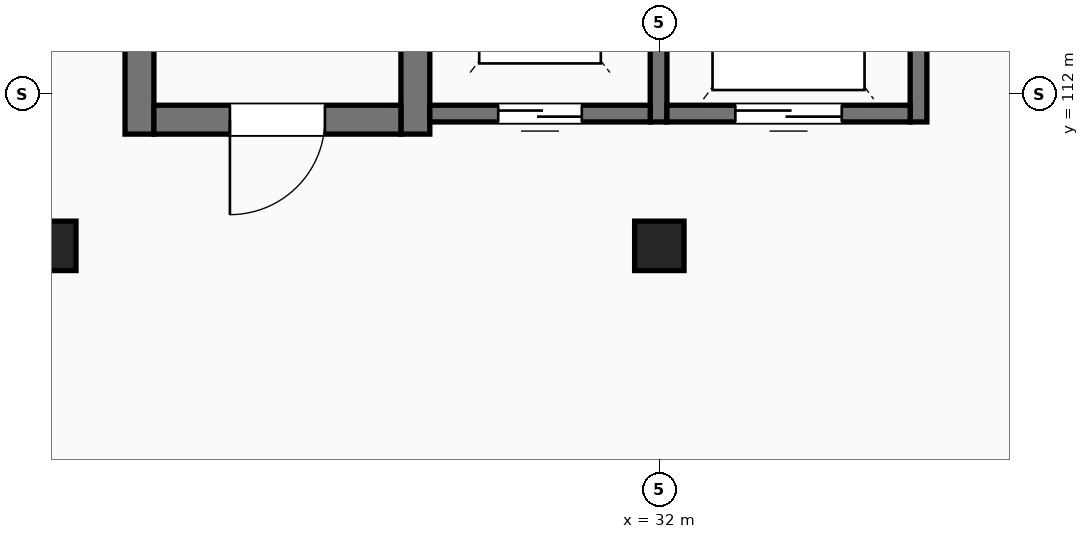
"""IFC4 building model, lengths in metres.
Left out: names, types, materials, properties, quantities, classifications, styles, units other than length and angle.
Written with IfcOpenShell. Run it as: python <this file> out.ifc"""

import sys

from ifc_helpers import new_model, si_unit, direction, frame, frame_2d, origin, origin_2d, place, context, subcontext, project, spatial, rectangle, extrude, element, fill, save


model = new_model("IFC4")
c1 = context("Model", 3, precision=1e-05, world=origin(), true_north=direction((0.0, 1.0)))
c2 = subcontext(c1, "Body", "Model", "MODEL_VIEW")
j1 = project(units=[si_unit("LENGTHUNIT", "METRE"), si_unit("PLANEANGLEUNIT", "RADIAN")], contexts=[c1])
p1 = place(None, origin())
s1 = spatial("IfcSite", under=j1, at=p1, CompositionType="ELEMENT")
p2 = place(p1, origin())
s2 = spatial("IfcBuilding", under=s1, at=p2, CompositionType="ELEMENT")
p3 = place(p2, origin())
s3 = spatial("IfcBuildingStorey", under=s2, at=p3, CompositionType="ELEMENT", Elevation=0.0)
for number, where, z_axis, x_axis in (
    (1, (24.0, 110.0, 0.0), (0.0, 0.0, 1.0), (1.0, 0.0, 0.0)),
    (2, (32.0, 110.0, 0.0), (0.0, 0.0, 1.0), (1.0, 0.0, 0.0)),
):
    element("IfcColumn", number, at=place(p3, frame(where, z_axis=z_axis, x_axis=x_axis)), inside=s3, PredefinedType="COLUMN", context=c2, shape_type="SweptSolid", body=[
        extrude(rectangle(XDim=0.65, YDim=0.65, at=origin_2d()), origin(), (0.0, 0.0, 1.0), 4.5),
    ])
for number, where, z_axis, x_axis in (
    (3, (25.16, 111.47, 0.0), (0.0, 0.0, 1.0), (0.0, 1.0, 0.0)),
    (4, (28.79, 121.53, 0.0), (0.0, 0.0, 1.0), (0.0, -1.0, 0.0)),
):
    element("IfcWall", number, at=place(p3, frame(where, z_axis=z_axis, x_axis=x_axis)), inside=s3, PredefinedType="SHEAR", context=c2, shape_type="SweptSolid", body=[
        extrude(rectangle(XDim=10.06, YDim=0.38, at=frame_2d((5.03, 0.0))), origin(), (0.0, 0.0, 1.0), 4.5),
    ])
p4 = place(p3, frame((28.6, 111.66, 0.0), z_axis=(0.0, 0.0, 1.0), x_axis=(-1.0, 0.0, 0.0)))
e5 = element("IfcWall", 5, at=p4, inside=s3, PredefinedType="SHEAR", context=c2, shape_type="SweptSolid", body=[
    extrude(rectangle(XDim=3.25, YDim=0.38, at=frame_2d((1.625, 0.0))), origin(), (0.0, 0.0, 1.0), 4.5),
])
p5 = place(p4, frame((1.0, 0.0, 0.0)))
e6 = element("IfcOpeningElement", 6, at=p5, cuts=e5, PredefinedType="OPENING", context=c2, shape_type="SweptSolid", body=[
    extrude(rectangle(XDim=1.25, YDim=2.2, at=frame_2d((0.625, 1.1))), frame((0.0, 0.2, 0.0), z_axis=(0.0, -1.0, 0.0), x_axis=(1.0, 0.0, 0.0)), (0.0, 0.0, 1.0), 0.4),
])
p6 = place(p3, frame((31.99, 115.27, 0.0), z_axis=(0.0, 0.0, 1.0), x_axis=(0.0, -1.0, 0.0)))
e7 = element("IfcWall", 7, at=p6, inside=s3, PredefinedType="SHEAR", context=c2, shape_type="SweptSolid", body=[
    extrude(rectangle(XDim=3.64, YDim=0.22, at=frame_2d((1.82, 0.0))), origin(), (0.0, 0.0, 1.0), 4.5),
])
p7 = place(p3, frame((31.88, 111.74, 0.0), z_axis=(0.0, 0.0, 1.0), x_axis=(-1.0, 0.0, 0.0)))
e8 = element("IfcWall", 8, at=p7, inside=s3, PredefinedType="SHEAR", context=c2, shape_type="SweptSolid", body=[
    extrude(rectangle(XDim=2.9, YDim=0.22, at=frame_2d((1.45, 0.0))), origin(), (0.0, 0.0, 1.0), 4.5),
])
p8 = place(p7, frame((0.9, 0.0, 0.0)))
e9 = element("IfcOpeningElement", 9, at=p8, cuts=e8, PredefinedType="OPENING", context=c2, shape_type="SweptSolid", body=[
    extrude(rectangle(XDim=1.1, YDim=2.2, at=frame_2d((0.55, 1.1))), frame((0.0, 0.12, 0.0), z_axis=(0.0, -1.0, 0.0), x_axis=(1.0, 0.0, 0.0)), (0.0, 0.0, 1.0), 0.24),
])
p9 = place(p3, frame((35.41, 115.27, 0.0), z_axis=(0.0, 0.0, 1.0), x_axis=(0.0, -1.0, 0.0)))
e10 = element("IfcWall", 10, at=p9, inside=s3, PredefinedType="SHEAR", context=c2, shape_type="SweptSolid", body=[
    extrude(rectangle(XDim=3.64, YDim=0.22, at=frame_2d((1.82, 0.0))), origin(), (0.0, 0.0, 1.0), 4.5),
])
p10 = place(p3, frame((35.3, 111.74, 0.0), z_axis=(0.0, 0.0, 1.0), x_axis=(-1.0, 0.0, 0.0)))
e11 = element("IfcWall", 11, at=p10, inside=s3, PredefinedType="SHEAR", context=c2, shape_type="SweptSolid", body=[
    extrude(rectangle(XDim=3.2, YDim=0.22, at=frame_2d((1.6, 0.0))), origin(), (0.0, 0.0, 1.0), 4.5),
])
p11 = place(p10, frame((0.9, 0.0, 0.0)))
e12 = element("IfcOpeningElement", 12, at=p11, cuts=e11, PredefinedType="OPENING", context=c2, shape_type="SweptSolid", body=[
    extrude(rectangle(XDim=1.4, YDim=2.3, at=frame_2d((0.7, 1.15))), frame((0.0, 0.12, 0.0), z_axis=(0.0, -1.0, 0.0), x_axis=(1.0, 0.0, 0.0)), (0.0, 0.0, 1.0), 0.24),
])
p12 = place(p5, origin())
e13 = element("IfcDoor", 13, at=p12, inside=s3, OperationType="SINGLE_SWING_RIGHT", PredefinedType="DOOR", context=c2, shape_type="SweptSolid", body=[
    extrude(rectangle(XDim=1.25, YDim=2.2, at=frame_2d((0.625, 1.1))), frame((0.0, 0.025, 0.0), z_axis=(0.0, -1.0, 0.0), x_axis=(1.0, 0.0, 0.0)), (0.0, 0.0, 1.0), 0.05),
])
fill(e6, e13)
p13 = place(p8, origin())
e14 = element("IfcDoor", 14, at=p13, inside=s3, OperationType="DOUBLE_DOOR_SLIDING", PredefinedType="DOOR", context=c2, shape_type="SweptSolid", body=[
    extrude(rectangle(XDim=1.1, YDim=2.2, at=frame_2d((0.55, 1.1))), frame((0.0, 0.025, 0.0), z_axis=(0.0, -1.0, 0.0), x_axis=(1.0, 0.0, 0.0)), (0.0, 0.0, 1.0), 0.05),
])
fill(e9, e14)
p14 = place(p11, origin())
e15 = element("IfcDoor", 15, at=p14, inside=s3, OperationType="DOUBLE_DOOR_SLIDING", PredefinedType="DOOR", context=c2, shape_type="SweptSolid", body=[
    extrude(rectangle(XDim=1.4, YDim=2.3, at=frame_2d((0.7, 1.15))), frame((0.0, 0.025, 0.0), z_axis=(0.0, -1.0, 0.0), x_axis=(1.0, 0.0, 0.0)), (0.0, 0.0, 1.0), 0.05),
])
fill(e12, e15)
save(model, sys.argv[1])
